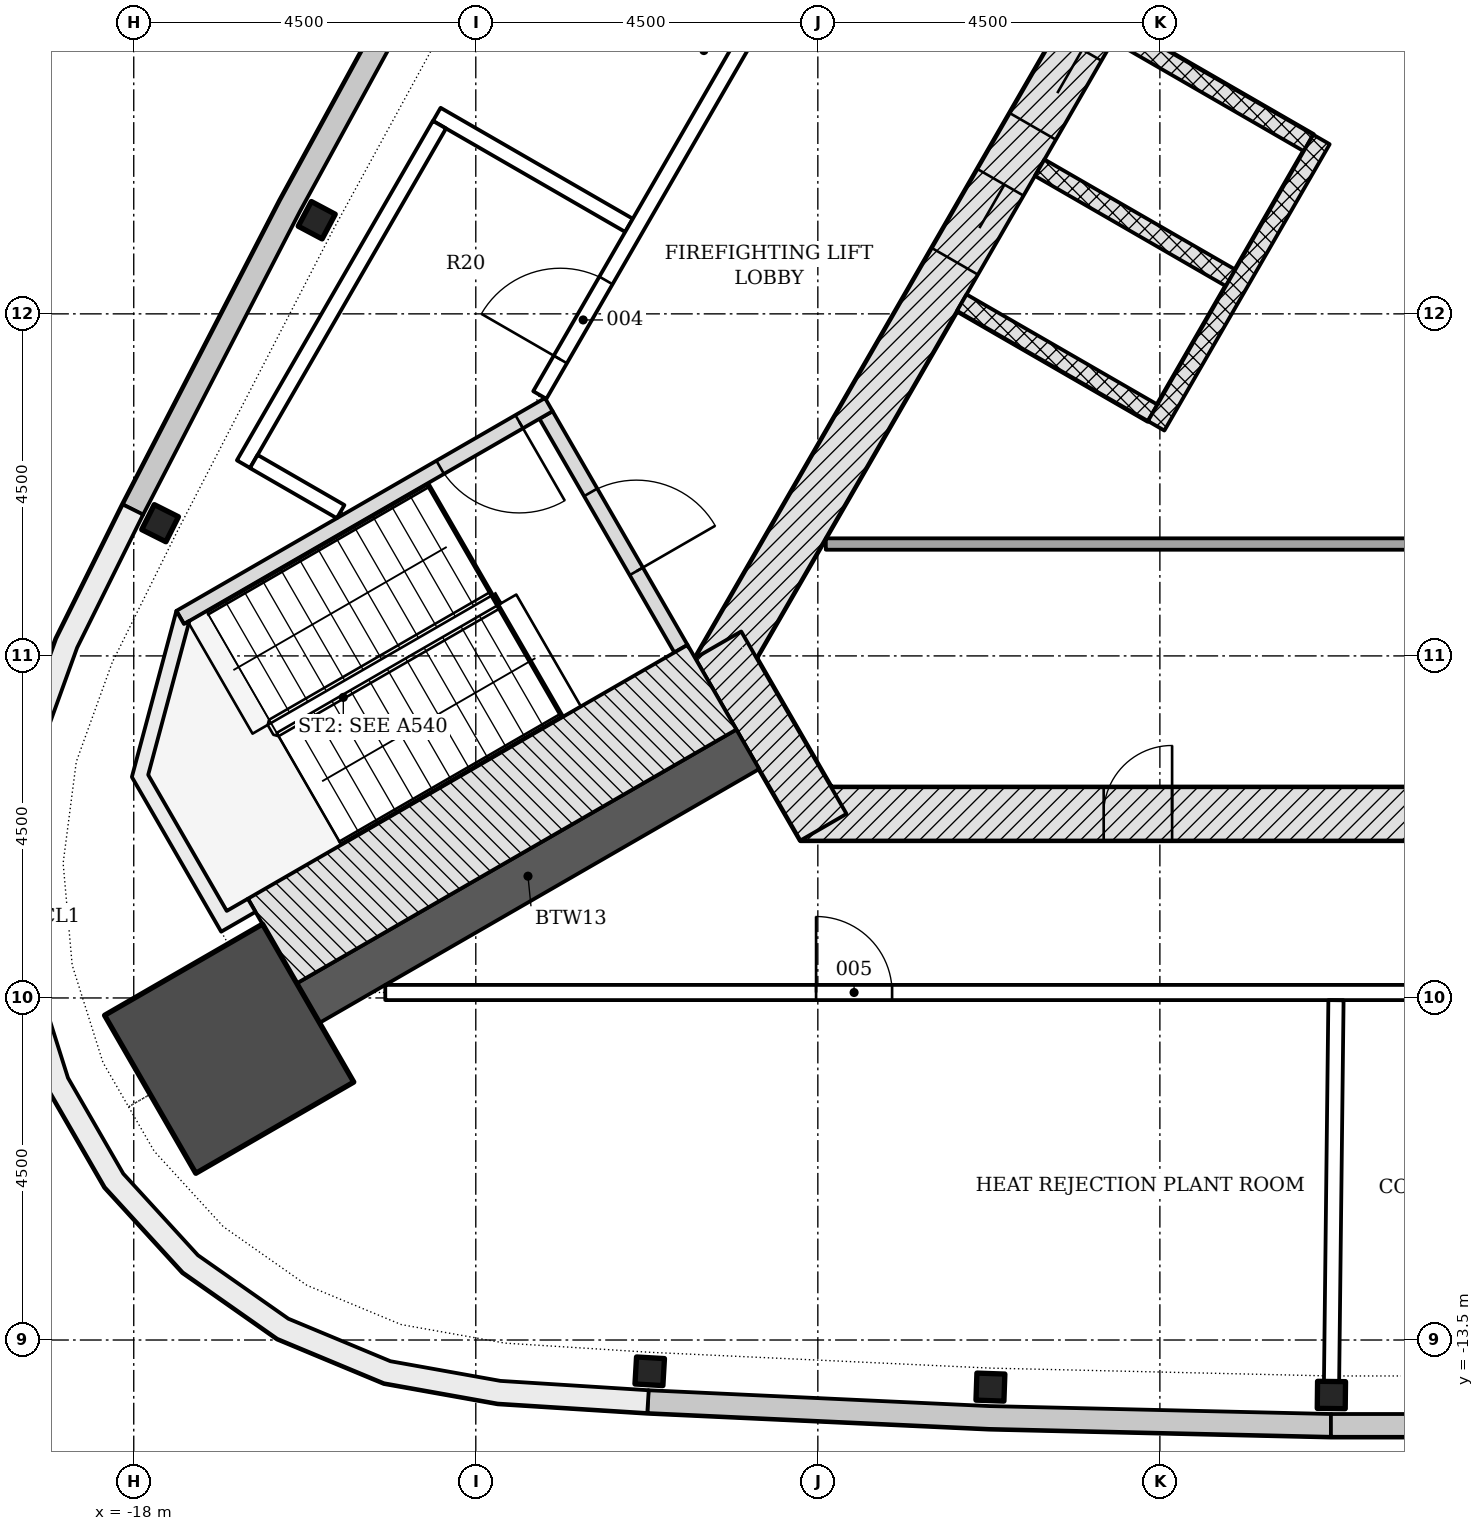
"""IFC4 building model, lengths in metres.
Left out: names, types, materials, properties, quantities, classifications, styles, units other than length and angle.
Written with IfcOpenShell. Run it as: python <this file> out.ifc"""

import sys

from ifc_helpers import new_model, si_unit, direction, frame, frame_2d, origin, origin_2d, place, context, subcontext, project, spatial, polyline, rectangle, i_section, outline, extrude, element, fill, save


model = new_model("IFC4")
c1 = context("Model", 3, precision=1e-05, world=origin(), true_north=direction((0.0, 1.0)))
c2 = subcontext(c1, "Body", "Model", "MODEL_VIEW")
j1 = project(units=[si_unit("LENGTHUNIT", "METRE"), si_unit("PLANEANGLEUNIT", "RADIAN")], contexts=[c1])
p1 = place(None, origin())
s1 = spatial("IfcSite", under=j1, at=p1, CompositionType="ELEMENT")
p2 = place(p1, origin())
s2 = spatial("IfcBuilding", under=s1, at=p2, CompositionType="ELEMENT")
p3 = place(p2, frame((0.0, 0.0, 284.1)))
s3 = spatial("IfcBuildingStorey", under=s2, at=p3, CompositionType="ELEMENT", Elevation=284.1)
p4 = place(p3, frame((-9.229, -6.578, -0.25), z_axis=(0.0, 0.0, 1.0), x_axis=(1.0, 0.0, 0.0)))
e1 = element("IfcWall", 1, at=p4, inside=s3, PredefinedType="SHEAR", context=c2, shape_type="SweptSolid", body=[
    extrude(rectangle(XDim=18.458, YDim=0.7, at=frame_2d((9.229, 0.0))), origin(), (0.0, 0.0, 1.0), 4.5),
])
p5 = place(p4, frame((8.7, 0.0, 0.25)))
e2 = element("IfcOpeningElement", 2, at=p5, cuts=e1, PredefinedType="OPENING", context=c2, shape_type="SweptSolid", body=[
    extrude(rectangle(XDim=1.0, YDim=2.1, at=frame_2d((0.5, 1.05))), frame((0.0, 0.36, 0.0), z_axis=(0.0, -1.0, 0.0), x_axis=(1.0, 0.0, 0.0)), (0.0, 0.0, 1.0), 0.72),
])
p6 = place(p4, frame((3.99, 0.0, 0.25)))
e3 = element("IfcOpeningElement", 3, at=p6, cuts=e1, PredefinedType="OPENING", context=c2, shape_type="SweptSolid", body=[
    extrude(rectangle(XDim=0.9, YDim=2.1, at=frame_2d((0.45, 1.05))), frame((0.0, 0.36, 0.0), z_axis=(0.0, -1.0, 0.0), x_axis=(1.0, 0.0, 0.0)), (0.0, 0.0, 1.0), 0.72),
])
p7 = place(p4, frame((13.539, 0.0, 0.25)))
e4 = element("IfcOpeningElement", 4, at=p7, cuts=e1, PredefinedType="OPENING", context=c2, shape_type="SweptSolid", body=[
    extrude(rectangle(XDim=0.9, YDim=2.1, at=frame_2d((0.45, 1.05))), frame((0.0, 0.36, 0.0), z_axis=(0.0, -1.0, 0.0), x_axis=(1.0, 0.0, 0.0)), (0.0, 0.0, 1.0), 0.72),
])
p8 = place(p3, frame((-1.083, 11.281, -0.25), z_axis=(0.0, 0.0, 1.0), x_axis=(-0.500001446645, -0.866024568562, 0.0)))
e5 = element("IfcWall", 5, at=p8, inside=s3, PredefinedType="SHEAR", context=c2, shape_type="SweptSolid", body=[
    extrude(rectangle(XDim=18.458, YDim=0.7, at=frame_2d((9.229, 0.0))), origin(), (0.0, 0.0, 1.0), 4.5),
])
p9 = place(p8, frame((8.979, 0.0, 0.25)))
e6 = element("IfcOpeningElement", 6, at=p9, cuts=e5, PredefinedType="OPENING", context=c2, shape_type="SweptSolid", body=[
    extrude(rectangle(XDim=1.2, YDim=2.1, at=frame_2d((0.6, 1.05))), frame((0.0, 0.36, 0.0), z_axis=(0.0, -1.0, 0.0), x_axis=(1.0, 0.0, 0.0)), (0.0, 0.0, 1.0), 0.72),
])
p10 = place(p8, frame((11.029, 0.0, 0.25)))
e7 = element("IfcOpeningElement", 7, at=p10, cuts=e5, PredefinedType="OPENING", context=c2, shape_type="SweptSolid", body=[
    extrude(rectangle(XDim=1.2, YDim=2.1, at=frame_2d((0.6, 1.05))), frame((0.0, 0.36, 0.0), z_axis=(0.0, -1.0, 0.0), x_axis=(1.0, 0.0, 0.0)), (0.0, 0.0, 1.0), 0.72),
])
p11 = place(p3, frame((-10.311, -4.353, -0.25), z_axis=(0.0, 0.0, 1.0), x_axis=(0.500042739161, -0.866000726912, 0.0)))
e8 = element("IfcWall", 8, at=p11, inside=s3, PredefinedType="SHEAR", context=c2, shape_type="SweptSolid", body=[
    extrude(rectangle(XDim=2.771, YDim=0.7, at=frame_2d((1.386, 0.0))), origin(), (0.0, 0.0, 1.0), 4.5),
])
p12 = place(p3, frame((-9.922, -5.728, -0.25), z_axis=(0.0, 0.0, 1.0), x_axis=(-0.866032176823, -0.499988268569, 0.0)))
e9 = element("IfcWall", 9, at=p12, inside=s3, PredefinedType="SHEAR", context=c2, shape_type="SweptSolid", body=[
    extrude(rectangle(XDim=6.678, YDim=0.6, at=frame_2d((3.339, 0.0))), origin(), (0.0, 0.0, 1.0), 4.5),
])
p13 = place(p3, frame((-16.745, -9.667, -0.25), z_axis=(0.0, 0.0, 1.0), x_axis=(-0.866025403784, -0.5, 0.0)))
e10 = element("IfcColumn", 10, at=p13, inside=s3, PredefinedType="COLUMN", context=c2, shape_type="SweptSolid", body=[
    extrude(rectangle(XDim=2.4, YDim=2.4, at=origin_2d()), origin(), (0.0, 0.0, 1.0), 4.5),
])
for number, where, z_axis, x_axis in (
    (11, (-15.593, 1.232, -0.25), (0.0, 0.0, 1.0), (-0.47, -0.883, 0.0)),
    (12, (-17.654, -2.754, -0.25), (0.0, 0.0, 1.0), (-0.449, -0.894, 0.0)),
    (13, (-11.212, -13.911, -0.25), (0.0, 0.0, 1.0), (0.998, -0.058, 0.0)),
    (14, (-6.729, -14.119, -0.25), (0.0, 0.0, 1.0), (0.999, -0.035, 0.0)),
    (15, (-2.244, -14.224, -0.25), (0.0, 0.0, 1.0), (1.0, -0.012, 0.0)),
):
    element("IfcColumn", number, at=place(p3, frame(where, z_axis=z_axis, x_axis=x_axis)), inside=s3, PredefinedType="COLUMN", context=c2, shape_type="SweptSolid", body=[
        extrude(i_section(OverallWidth=0.368, OverallDepth=0.356, WebThickness=0.011, FlangeThickness=0.018, FilletRadius=0.015, at=origin_2d()), origin(), (0.0, 0.0, 1.0), 4.5),
    ])
p14 = place(p3, origin())
e16 = element("IfcWall", 16, at=p14, inside=s3, PredefinedType="NOTDEFINED", context=c2, shape_type="SweptSolid", body=[
    extrude(outline(polyline([(-13.919, 5.438), (-16.078, 1.49), (-18.145, -2.507), (-17.878, -2.645), (-15.813, 1.349), (-13.656, 5.294), (-13.919, 5.438)])), origin(), (0.0, 0.0, 1.0), 4.25),
])
p15 = place(p3, origin())
e17 = element("IfcWall", 17, at=p15, inside=s3, PredefinedType="NOTDEFINED", context=c2, shape_type="SweptSolid", body=[
    extrude(outline(polyline([(-11.244, -14.46), (-6.749, -14.669), (-2.25, -14.773), (-2.243, -14.474), (-6.738, -14.369), (-11.23, -14.161), (-11.244, -14.46)])), origin(), (0.0, 0.0, 1.0), 4.25),
])
p16 = place(p3, origin())
e18 = element("IfcWall", 18, at=p16, inside=s3, PredefinedType="NOTDEFINED", context=c2, shape_type="SweptSolid", body=[
    extrude(outline(polyline([(-2.25, -14.773), (2.25, -14.773), (2.25, -14.473), (-2.25, -14.473), (-2.25, -14.773)])), origin(), (0.0, 0.0, 1.0), 1.2),
])
p17 = place(p3, origin())
e19 = element("IfcWall", 19, at=p17, inside=s3, PredefinedType="NOTDEFINED", context=c2, shape_type="SweptSolid", body=[
    extrude(outline(polyline([(-18.145, -2.507), (-19.021, -4.273), (-19.538, -5.703), (-19.733, -7.21), (-19.599, -8.724), (-19.141, -10.174), (-18.381, -11.49), (-17.355, -12.611), (-16.111, -13.485), (-14.708, -14.069), (-13.211, -14.336), (-11.244, -14.46), (-11.225, -14.161), (-13.176, -14.038), (-14.623, -13.779), (-15.965, -13.22), (-17.156, -12.385), (-18.138, -11.312), (-18.865, -10.052), (-19.303, -8.665), (-19.432, -7.216), (-19.244, -5.774), (-18.745, -4.391), (-17.876, -2.64), (-18.145, -2.507)])), origin(), (0.0, 0.0, 1.0), 4.25),
])
for number, where, z_axis, x_axis in (
    (20, (-5.056, 3.699, -0.25), (0.0, 0.0, 1.0), (0.866, -0.5, 0.0)),
    (21, (-6.081, 1.923, -0.25), (0.0, 0.0, 1.0), (0.866, -0.5, 0.0)),
    (22, (-7.106, 0.148, -0.25), (0.0, 0.0, 1.0), (0.866, -0.5, 0.0)),
):
    element("IfcWall", number, at=place(p3, frame(where, z_axis=z_axis, x_axis=x_axis)), inside=s3, PredefinedType="PARTITIONING", context=c2, shape_type="SweptSolid", body=[
        extrude(rectangle(XDim=2.9, YDim=0.25, at=frame_2d((1.45, 0.0))), origin(), (0.0, 0.0, 1.0), 4.5),
    ])
p18 = place(p3, frame((-2.374, 2.294, 0.0), z_axis=(0.0, 0.0, 1.0), x_axis=(-0.499996127374, -0.866027639635, 0.0)))
e23 = element("IfcWall", 23, at=p18, inside=s3, PredefinedType="PARTITIONING", context=c2, shape_type="SweptSolid", body=[
    extrude(rectangle(XDim=4.35, YDim=0.25, at=frame_2d((2.175, 0.0))), origin(), (0.0, 0.0, 1.0), 4.25),
])
p19 = place(p3, frame((-8.895, -3.028, 0.0), z_axis=(0.0, 0.0, 1.0), x_axis=(1.0, 0.0, 0.0)))
e24 = element("IfcWall", 24, at=p19, inside=s3, PredefinedType="PARTITIONING", context=c2, shape_type="SweptSolid", body=[
    extrude(rectangle(XDim=8.066, YDim=0.15, at=frame_2d((4.033, 0.0))), origin(), (0.0, 0.0, 1.0), 4.25),
])
p20 = place(p3, frame((-12.576, -1.331, -0.25), z_axis=(0.0, 0.0, 1.0), x_axis=(0.499970499736, -0.8660424351, 0.0)))
e25 = element("IfcWall", 25, at=p20, inside=s3, PredefinedType="SHEAR", context=c2, shape_type="SweptSolid", body=[
    extrude(rectangle(XDim=3.55, YDim=0.2, at=frame_2d((1.775, 0.0))), origin(), (0.0, 0.0, 1.0), 4.5),
])
p21 = place(p20, frame((1.175, 0.0, 0.25)))
e26 = element("IfcOpeningElement", 26, at=p21, cuts=e25, PredefinedType="OPENING", context=c2, shape_type="SweptSolid", body=[
    extrude(rectangle(XDim=1.2, YDim=2.1, at=frame_2d((0.6, 1.05))), frame((0.0, 0.11, 0.0), z_axis=(0.0, -1.0, 0.0), x_axis=(1.0, 0.0, 0.0)), (0.0, 0.0, 1.0), 0.22),
])
p22 = place(p3, frame((-12.539, -1.194, -0.25), z_axis=(0.0, 0.0, 1.0), x_axis=(-0.866045472092, -0.499965239061, 0.0)))
e27 = element("IfcWall", 27, at=p22, inside=s3, PredefinedType="SHEAR", context=c2, shape_type="SweptSolid", body=[
    extrude(rectangle(XDim=5.6, YDim=0.2, at=frame_2d((2.8, 0.0))), origin(), (0.0, 0.0, 1.0), 4.5),
])
p23 = place(p22, frame((0.45, 0.0, 0.25)))
e28 = element("IfcOpeningElement", 28, at=p23, cuts=e27, PredefinedType="OPENING", context=c2, shape_type="SweptSolid", body=[
    extrude(rectangle(XDim=1.2, YDim=2.1, at=frame_2d((0.6, 1.05))), frame((0.0, 0.11, 0.0), z_axis=(0.0, -1.0, 0.0), x_axis=(1.0, 0.0, 0.0)), (0.0, 0.0, 1.0), 0.22),
])
p24 = place(p3, frame((-10.393, -4.912, -0.25), z_axis=(0.0, 0.0, 1.0), x_axis=(-0.866025486527, -0.499999856685, 0.0)))
e29 = element("IfcWall", 29, at=p24, inside=s3, PredefinedType="SHEAR", context=c2, shape_type="SweptSolid", body=[
    extrude(rectangle(XDim=6.679, YDim=1.286, at=frame_2d((3.339, 0.0))), origin(), (0.0, 0.0, 1.0), 4.5),
])
p25 = place(p3, frame((0.0, 0.0, -0.25)))
e30 = element("IfcWall", 30, at=p25, inside=s3, PredefinedType="SHEAR", context=c2, shape_type="SweptSolid", body=[
    extrude(outline(polyline([(-17.439, -3.907), (-18.025, -6.093), (-16.85, -8.128), (-16.398, -7.867), (-16.498, -7.694), (-16.498, -7.694), (-16.777, -7.855), (-17.81, -6.065), (-17.267, -4.039), (-17.339, -4.081), (-17.339, -4.081), (-17.339, -4.081), (-17.339, -4.081), (-17.339, -4.081), (-17.339, -4.081), (-17.339, -4.081), (-17.339, -4.081), (-17.339, -4.081), (-17.339, -4.081), (-17.339, -4.081), (-17.339, -4.081), (-17.339, -4.081), (-17.339, -4.081), (-17.339, -4.081), (-17.339, -4.081), (-17.339, -4.081), (-17.439, -3.907)])), origin(), (0.0, 0.0, 1.0), 4.5),
])
p26 = place(p3, frame((-14.013, 2.625, 0.0), z_axis=(0.0, 0.0, 1.0), x_axis=(0.866026830048, -0.499997529631, 0.0)))
e31 = element("IfcWall", 31, at=p26, inside=s3, PredefinedType="PARTITIONING", context=c2, shape_type="SweptSolid", body=[
    extrude(rectangle(XDim=2.919, YDim=0.2, at=frame_2d((1.46, 0.0))), origin(), (0.0, 0.0, 1.0), 4.25),
])
p27 = place(p3, frame((-12.658, -1.068, 0.0), z_axis=(0.0, 0.0, 1.0), x_axis=(0.499996073327, 0.866027670838, 0.0)))
e32 = element("IfcWall", 32, at=p27, inside=s3, PredefinedType="PARTITIONING", context=c2, shape_type="SweptSolid", body=[
    extrude(rectangle(XDim=7.904, YDim=0.2, at=frame_2d((3.952, 0.0))), origin(), (0.0, 0.0, 1.0), 3.702),
])
p28 = place(p27, frame((0.541, 0.0, 0.0)))
e33 = element("IfcOpeningElement", 33, at=p28, cuts=e32, PredefinedType="OPENING", context=c2, shape_type="SweptSolid", body=[
    extrude(rectangle(XDim=1.2, YDim=2.1, at=frame_2d((0.6, 1.05))), frame((0.0, 0.11, 0.0), z_axis=(0.0, -1.0, 0.0), x_axis=(1.0, 0.0, 0.0)), (0.0, 0.0, 1.0), 0.22),
])
p29 = place(p3, frame((-13.978, 2.489, 0.0), z_axis=(0.0, 0.0, 1.0), x_axis=(-0.499983365876, -0.866035007288, 0.0)))
e34 = element("IfcWall", 34, at=p29, inside=s3, PredefinedType="PARTITIONING", context=c2, shape_type="SweptSolid", body=[
    extrude(rectangle(XDim=5.157, YDim=0.2, at=frame_2d((2.579, 0.0))), origin(), (0.0, 0.0, 1.0), 3.702),
])
p30 = place(p3, frame((-16.421, -1.942, 0.0), z_axis=(0.0, 0.0, 1.0), x_axis=(0.865991484893, -0.500058744641, 0.0)))
e35 = element("IfcWall", 35, at=p30, inside=s3, PredefinedType="PARTITIONING", context=c2, shape_type="SweptSolid", body=[
    extrude(rectangle(XDim=1.32, YDim=0.2, at=frame_2d((0.66, 0.0))), origin(), (0.0, 0.0, 1.0), 4.25),
])
p31 = place(p3, frame((-14.691, -8.928, 0.0), z_axis=(0.0, 0.0, 1.0), x_axis=(1.0, 0.0, 0.0)))
e36 = element("IfcWall", 36, at=p31, inside=s3, PredefinedType="PARTITIONING", context=c2, shape_type="SweptSolid", body=[
    extrude(rectangle(XDim=19.591, YDim=0.2, at=frame_2d((9.795, 0.0))), origin(), (0.0, 0.0, 1.0), 3.702),
])
p32 = place(p31, frame((5.668, 0.0, 0.0)))
e37 = element("IfcOpeningElement", 37, at=p32, cuts=e36, PredefinedType="OPENING", context=c2, shape_type="SweptSolid", body=[
    extrude(rectangle(XDim=1.0, YDim=2.1, at=frame_2d((0.5, 1.05))), frame((0.0, 0.11, 0.0), z_axis=(0.0, -1.0, 0.0), x_axis=(1.0, 0.0, 0.0)), (0.0, 0.0, 1.0), 0.22),
])
p33 = place(p31, frame((14.293, 0.0, 0.0)))
e38 = element("IfcOpeningElement", 38, at=p33, cuts=e36, PredefinedType="OPENING", context=c2, shape_type="SweptSolid", body=[
    extrude(rectangle(XDim=1.0, YDim=2.1, at=frame_2d((0.5, 1.05))), frame((0.0, 0.11, 0.0), z_axis=(0.0, -1.0, 0.0), x_axis=(1.0, 0.0, 0.0)), (0.0, 0.0, 1.0), 0.22),
])
p34 = place(p31, frame((17.625, 0.0, 0.0)))
e39 = element("IfcOpeningElement", 39, at=p34, cuts=e36, PredefinedType="OPENING", context=c2, shape_type="SweptSolid", body=[
    extrude(rectangle(XDim=1.0, YDim=2.1, at=frame_2d((0.5, 1.05))), frame((0.0, 0.11, 0.0), z_axis=(0.0, -1.0, 0.0), x_axis=(1.0, 0.0, 0.0)), (0.0, 0.0, 1.0), 0.22),
])
p35 = place(p3, frame((-2.242, -14.073, 0.0), z_axis=(0.0, 0.0, 1.0), x_axis=(0.011566914048, 0.999933101012, 0.0)))
e40 = element("IfcWall", 40, at=p35, inside=s3, PredefinedType="PARTITIONING", context=c2, shape_type="SweptSolid", body=[
    extrude(rectangle(XDim=5.044, YDim=0.2, at=frame_2d((2.522, 0.0))), origin(), (0.0, 0.0, 1.0), 3.702),
])
p36 = place(p9, origin())
e41 = element("IfcDoor", 41, at=p36, inside=s3, OperationType="DOUBLE_DOOR_SLIDING", PredefinedType="DOOR", context=c2, shape_type="SweptSolid", body=[
    extrude(rectangle(XDim=1.2, YDim=2.1, at=frame_2d((0.6, 1.05))), frame((0.0, 0.025, 0.0), z_axis=(0.0, -1.0, 0.0), x_axis=(1.0, 0.0, 0.0)), (0.0, 0.0, 1.0), 0.05),
])
fill(e6, e41)
p37 = place(p10, origin())
e42 = element("IfcDoor", 42, at=p37, inside=s3, OperationType="DOUBLE_DOOR_SLIDING", PredefinedType="DOOR", context=c2, shape_type="SweptSolid", body=[
    extrude(rectangle(XDim=1.2, YDim=2.1, at=frame_2d((0.6, 1.05))), frame((0.0, 0.025, 0.0), z_axis=(0.0, -1.0, 0.0), x_axis=(1.0, 0.0, 0.0)), (0.0, 0.0, 1.0), 0.05),
])
fill(e7, e42)
p38 = place(p6, origin())
e43 = element("IfcDoor", 43, at=p38, inside=s3, OperationType="SINGLE_SWING_RIGHT", PredefinedType="DOOR", context=c2, shape_type="SweptSolid", body=[
    extrude(rectangle(XDim=0.9, YDim=2.1, at=frame_2d((0.45, 1.05))), frame((0.0, 0.075, 0.0), z_axis=(0.0, -1.0, 0.0), x_axis=(1.0, 0.0, 0.0)), (0.0, 0.0, 1.0), 0.15),
])
fill(e3, e43)
p39 = place(p21, origin())
e44 = element("IfcDoor", 44, at=p39, inside=s3, OperationType="SINGLE_SWING_RIGHT", PredefinedType="DOOR", context=c2, shape_type="SweptSolid", body=[
    extrude(rectangle(XDim=1.2, YDim=2.1, at=frame_2d((0.6, 1.05))), frame((0.0, 0.025, 0.0), z_axis=(0.0, -1.0, 0.0), x_axis=(1.0, 0.0, 0.0)), (0.0, 0.0, 1.0), 0.05),
])
fill(e26, e44)
p40 = place(p23, origin())
e45 = element("IfcDoor", 45, at=p40, inside=s3, OperationType="SINGLE_SWING_LEFT", PredefinedType="DOOR", context=c2, shape_type="SweptSolid", body=[
    extrude(rectangle(XDim=1.2, YDim=2.1, at=frame_2d((0.6, 1.05))), frame((0.0, 0.025, 0.0), z_axis=(0.0, -1.0, 0.0), x_axis=(1.0, 0.0, 0.0)), (0.0, 0.0, 1.0), 0.05),
])
fill(e28, e45)
p41 = place(p28, origin())
e46 = element("IfcDoor", 46, at=p41, inside=s3, OperationType="SINGLE_SWING_LEFT", PredefinedType="DOOR", context=c2, shape_type="SweptSolid", body=[
    extrude(rectangle(XDim=1.2, YDim=2.1, at=frame_2d((0.6, 1.05))), frame((0.0, 0.025, 0.0), z_axis=(0.0, -1.0, 0.0), x_axis=(1.0, 0.0, 0.0)), (0.0, 0.0, 1.0), 0.05),
])
fill(e33, e46)
p42 = place(p32, origin())
e47 = element("IfcDoor", 47, at=p42, inside=s3, OperationType="SINGLE_SWING_LEFT", PredefinedType="DOOR", context=c2, shape_type="SweptSolid", body=[
    extrude(rectangle(XDim=1.0, YDim=2.1, at=frame_2d((0.5, 1.05))), frame((0.0, 0.025, 0.0), z_axis=(0.0, -1.0, 0.0), x_axis=(1.0, 0.0, 0.0)), (0.0, 0.0, 1.0), 0.05),
])
fill(e37, e47)
save(model, sys.argv[1])
